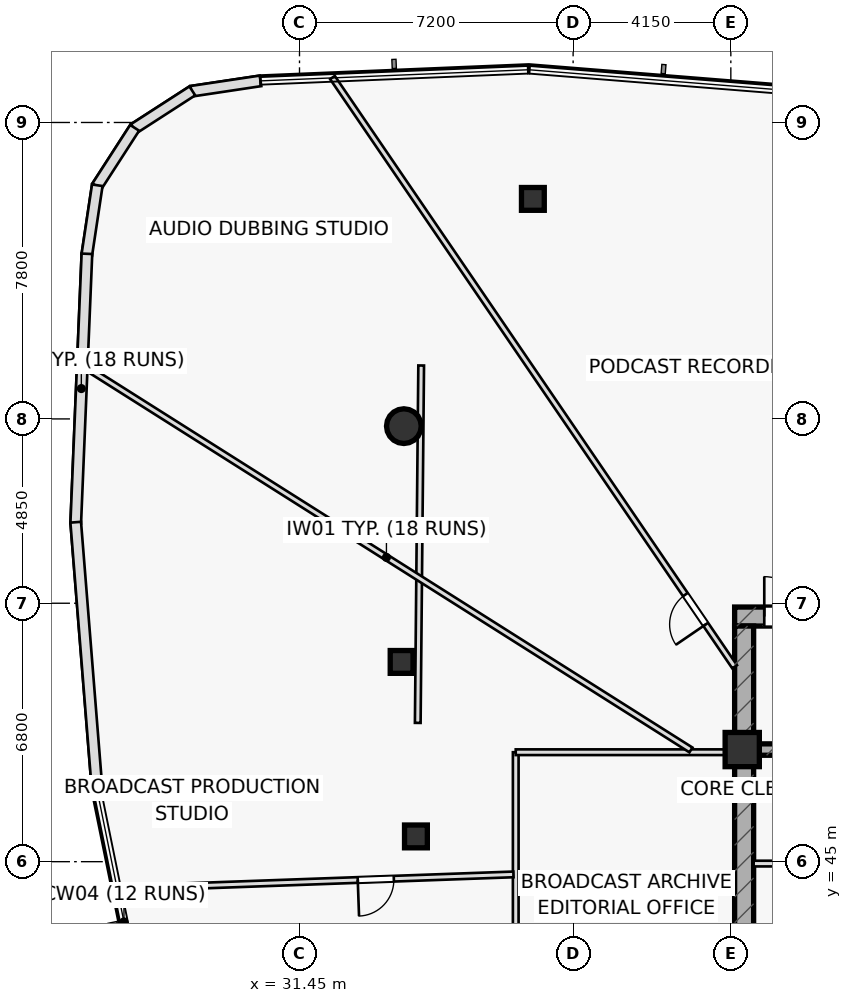
"""IFC4 building model, lengths in metres.
Left out: names, types, materials, properties, quantities, classifications, styles, units other than length and angle.
Written with IfcOpenShell. Run it as: python <this file> out.ifc"""

import sys

from ifc_helpers import new_model, si_unit, direction, frame, frame_2d, origin, origin_2d, place, context, subcontext, project, spatial, rectangle, hollow_rectangle, hollow_circle, extrude, element, fill, save


model = new_model("IFC4")
c1 = context("Model", 3, precision=1e-05, world=origin(), true_north=direction((0.0, 1.0)))
c2 = subcontext(c1, "Body", "Model", "MODEL_VIEW")
j1 = project(units=[si_unit("LENGTHUNIT", "METRE"), si_unit("PLANEANGLEUNIT", "RADIAN")], contexts=[c1])
p1 = place(None, origin())
s1 = spatial("IfcSite", under=j1, at=p1, CompositionType="ELEMENT")
p2 = place(p1, origin())
s2 = spatial("IfcBuilding", under=s1, at=p2, CompositionType="ELEMENT")
p3 = place(p2, frame((0.0, 0.0, 230.05)))
s3 = spatial("IfcBuildingStorey", under=s2, at=p3, CompositionType="ELEMENT", Elevation=230.05)
p4 = place(p3, frame((42.9, 51.45, 0.0), z_axis=(0.0, 0.0, 1.0), x_axis=(1.0, 0.0, 0.0)))
e1 = element("IfcWall", 1, at=p4, inside=s3, PredefinedType="SHEAR", context=c2, shape_type="SweptSolid", body=[
    extrude(rectangle(XDim=14.2, YDim=0.5, at=frame_2d((7.1, 0.0))), origin(), (0.0, 0.0, 1.0), 3.65),
])
p5 = place(p4, frame((0.78, 0.0, 0.0)))
e2 = element("IfcOpeningElement", 2, at=p5, cuts=e1, PredefinedType="OPENING", context=c2, shape_type="SweptSolid", body=[
    extrude(rectangle(XDim=1.05, YDim=2.2, at=frame_2d((0.525, 1.1))), frame((0.0, 0.26, 0.0), z_axis=(0.0, -1.0, 0.0), x_axis=(1.0, 0.0, 0.0)), (0.0, 0.0, 1.0), 0.52),
])
p6 = place(p3, frame((43.15, 38.8, 0.0), z_axis=(0.0, 0.0, 1.0), x_axis=(0.0, 1.0, 0.0)))
e3 = element("IfcWall", 3, at=p6, inside=s3, PredefinedType="SHEAR", context=c2, shape_type="SweptSolid", body=[
    extrude(rectangle(XDim=12.4, YDim=0.5, at=frame_2d((6.2, 0.0))), origin(), (0.0, 0.0, 1.0), 3.65),
])
p7 = place(p3, frame((43.4, 47.95, 0.0), z_axis=(0.0, 0.0, 1.0), x_axis=(1.0, 0.0, 0.0)))
e4 = element("IfcWall", 4, at=p7, inside=s3, PredefinedType="SHEAR", context=c2, shape_type="SweptSolid", body=[
    extrude(rectangle(XDim=13.2, YDim=0.3, at=frame_2d((6.6, 0.0))), origin(), (0.0, 0.0, 1.0), 3.65),
])
p8 = place(p7, frame((8.345, 0.0, 0.0)))
e5 = element("IfcOpeningElement", 5, at=p8, cuts=e4, PredefinedType="OPENING", context=c2, shape_type="SweptSolid", body=[
    extrude(rectangle(XDim=1.15, YDim=2.2, at=frame_2d((0.575, 1.1))), frame((0.0, 0.16, 0.0), z_axis=(0.0, -1.0, 0.0), x_axis=(1.0, 0.0, 0.0)), (0.0, 0.0, 1.0), 0.32),
])
p9 = place(p7, frame((10.065, 0.0, 0.0)))
e6 = element("IfcOpeningElement", 6, at=p9, cuts=e4, PredefinedType="OPENING", context=c2, shape_type="SweptSolid", body=[
    extrude(rectangle(XDim=1.15, YDim=2.2, at=frame_2d((0.575, 1.1))), frame((0.0, 0.16, 0.0), z_axis=(0.0, -1.0, 0.0), x_axis=(1.0, 0.0, 0.0)), (0.0, 0.0, 1.0), 0.32),
])
p10 = place(p7, frame((11.645, 0.0, 0.0)))
e7 = element("IfcOpeningElement", 7, at=p10, cuts=e4, PredefinedType="OPENING", context=c2, shape_type="SweptSolid", body=[
    extrude(rectangle(XDim=1.15, YDim=2.2, at=frame_2d((0.575, 1.1))), frame((0.0, 0.16, 0.0), z_axis=(0.0, -1.0, 0.0), x_axis=(1.0, 0.0, 0.0)), (0.0, 0.0, 1.0), 0.32),
])
p11 = place(p3, frame((43.1, 47.95, 0.0), z_axis=(0.0, 0.0, 1.0), x_axis=(1.0, 0.0, 0.0)))
e8 = element("IfcColumn", 8, at=p11, inside=s3, PredefinedType="COLUMN", context=c2, shape_type="SweptSolid", body=[
    extrude(rectangle(XDim=0.9, YDim=0.9, at=origin_2d()), origin(), (0.0, 0.0, 1.0), 3.65),
])
p12 = place(p3, frame((34.196, 56.46, 0.0), z_axis=(0.0, 0.0, 1.0), x_axis=(1.0, 0.0, 0.0)))
e9 = element("IfcColumn", 9, at=p12, inside=s3, PredefinedType="COLUMN", context=c2, shape_type="SweptSolid", body=[
    extrude(hollow_circle(Radius=0.457, WallThickness=0.04, at=origin_2d()), origin(), (0.0, 0.0, 1.0), 3.65),
])
for number, where, z_axis, x_axis in (
    (10, (34.137, 50.256, 0.0), (0.0, 0.0, 1.0), (1.0, 0.0, 0.0)),
    (11, (34.514, 45.665, 0.0), (0.0, 0.0, 1.0), (1.0, 0.0, 0.0)),
    (12, (37.591, 62.439, 0.0), (0.0, 0.0, 1.0), (1.0, 0.0, 0.0)),
):
    element("IfcColumn", number, at=place(p3, frame(where, z_axis=z_axis, x_axis=x_axis)), inside=s3, PredefinedType="COLUMN", context=c2, shape_type="SweptSolid", body=[
        extrude(hollow_rectangle(XDim=0.6, YDim=0.6, WallThickness=0.036, at=origin_2d()), origin(), (0.0, 0.0, 1.0), 3.65),
    ])
p13 = place(p3, frame((43.4, 44.95, 0.0), z_axis=(0.0, 0.0, 1.0), x_axis=(1.0, 0.0, 0.0)))
e13 = element("IfcWall", 13, at=p13, inside=s3, PredefinedType="PARTITIONING", context=c2, shape_type="SweptSolid", body=[
    extrude(rectangle(XDim=2.35, YDim=0.15, at=frame_2d((1.175, 0.0))), origin(), (0.0, 0.0, 1.0), 3.65),
])
p14 = place(p3, frame((34.652, 58.056, 0.0), z_axis=(0.0, 0.0, 1.0), x_axis=(-0.009553538759, -0.999954363907, 0.0)))
e14 = element("IfcWall", 14, at=p14, inside=s3, PredefinedType="PARTITIONING", context=c2, shape_type="SweptSolid", body=[
    extrude(rectangle(XDim=9.404, YDim=0.15, at=frame_2d((4.702, 0.0))), origin(), (0.0, 0.0, 1.0), 3.135),
])
p15 = place(p3, frame((37.14, 40.3, 0.0), z_axis=(0.0, 0.0, 1.0), x_axis=(0.0, 1.0, 0.0)))
e15 = element("IfcWall", 15, at=p15, inside=s3, PredefinedType="PARTITIONING", context=c2, shape_type="SweptSolid", body=[
    extrude(rectangle(XDim=7.58, YDim=0.15, at=frame_2d((3.79, 0.0))), origin(), (0.0, 0.0, 1.0), 3.65),
])
p16 = place(p3, frame((37.14, 47.88, 0.0), z_axis=(0.0, 0.0, 1.0), x_axis=(1.0, 0.0, 0.0)))
e16 = element("IfcWall", 16, at=p16, inside=s3, PredefinedType="PARTITIONING", context=c2, shape_type="SweptSolid", body=[
    extrude(rectangle(XDim=5.76, YDim=0.15, at=frame_2d((2.88, 0.0))), origin(), (0.0, 0.0, 1.0), 3.025),
])
p17 = place(p3, frame((42.9, 50.128, 0.0), z_axis=(0.0, 0.0, 1.0), x_axis=(-0.563742719505, 0.825950450212, 0.0)))
e17 = element("IfcWall", 17, at=p17, inside=s3, PredefinedType="PARTITIONING", context=c2, shape_type="SweptSolid", body=[
    extrude(rectangle(XDim=18.773, YDim=0.15, at=frame_2d((9.386, 0.0))), origin(), (0.0, 0.0, 1.0), 3.025),
])
p18 = place(p17, frame((1.35, 0.0, 0.0)))
e18 = element("IfcOpeningElement", 18, at=p18, cuts=e17, PredefinedType="OPENING", context=c2, shape_type="SweptSolid", body=[
    extrude(rectangle(XDim=0.95, YDim=2.05, at=frame_2d((0.475, 1.025))), frame((0.0, 0.085, 0.0), z_axis=(0.0, -1.0, 0.0), x_axis=(1.0, 0.0, 0.0)), (0.0, 0.0, 1.0), 0.17),
])
p19 = place(p3, frame((41.75, 47.94, 0.0), z_axis=(0.0, 0.0, 1.0), x_axis=(-0.845214636511, 0.534426999905, 0.0)))
e19 = element("IfcWall", 19, at=p19, inside=s3, PredefinedType="PARTITIONING", context=c2, shape_type="SweptSolid", body=[
    extrude(rectangle(XDim=18.96, YDim=0.15, at=frame_2d((9.48, 0.0))), origin(), (0.0, 0.0, 1.0), 3.025),
])
p20 = place(p3, frame((37.08, 44.665, 0.0), z_axis=(0.0, 0.0, 1.0), x_axis=(-0.99935523855, -0.035904138807, 0.0)))
e20 = element("IfcWall", 20, at=p20, inside=s3, PredefinedType="PARTITIONING", context=c2, shape_type="SweptSolid", body=[
    extrude(rectangle(XDim=10.445, YDim=0.15, at=frame_2d((5.222, 0.0))), origin(), (0.0, 0.0, 1.0), 3.135),
])
p21 = place(p20, frame((3.15, 0.0, 0.0)))
e21 = element("IfcOpeningElement", 21, at=p21, cuts=e20, PredefinedType="OPENING", context=c2, shape_type="SweptSolid", body=[
    extrude(rectangle(XDim=0.95, YDim=2.05, at=frame_2d((0.475, 1.025))), frame((0.0, 0.085, 0.0), z_axis=(0.0, -1.0, 0.0), x_axis=(1.0, 0.0, 0.0)), (0.0, 0.0, 1.0), 0.17),
])
p22 = place(p3, frame((30.424, 65.545, 0.0), z_axis=(0.0, 0.0, 1.0), x_axis=(-0.988886729677, -0.148670897856, 0.0)))
e22 = element("IfcWall", 22, at=p22, inside=s3, PredefinedType="STANDARD", context=c2, shape_type="SweptSolid", body=[
    extrude(rectangle(XDim=1.843, YDim=0.28, at=frame_2d((0.921, 0.0))), origin(), (0.0, 0.0, 1.0), 3.65),
])
p23 = place(p3, frame((28.629, 65.281, 0.0), z_axis=(0.0, 0.0, 1.0), x_axis=(-0.84006342803, -0.54248819055, 0.0)))
e23 = element("IfcWall", 23, at=p23, inside=s3, PredefinedType="STANDARD", context=c2, shape_type="SweptSolid", body=[
    extrude(rectangle(XDim=1.831, YDim=0.28, at=frame_2d((0.916, 0.0))), origin(), (0.0, 0.0, 1.0), 3.65),
])
p24 = place(p3, frame((27.112, 64.309, 0.0), z_axis=(0.0, 0.0, 1.0), x_axis=(-0.542394093963, -0.840124185364, 0.0)))
e24 = element("IfcWall", 24, at=p24, inside=s3, PredefinedType="STANDARD", context=c2, shape_type="SweptSolid", body=[
    extrude(rectangle(XDim=1.831, YDim=0.28, at=frame_2d((0.916, 0.0))), origin(), (0.0, 0.0, 1.0), 3.65),
])
p25 = place(p3, frame((26.129, 62.798, 0.0), z_axis=(0.0, 0.0, 1.0), x_axis=(-0.148701117204, -0.988882185977, 0.0)))
e25 = element("IfcWall", 25, at=p25, inside=s3, PredefinedType="STANDARD", context=c2, shape_type="SweptSolid", body=[
    extrude(rectangle(XDim=1.854, YDim=0.28, at=frame_2d((0.927, 0.0))), origin(), (0.0, 0.0, 1.0), 3.65),
])
p26 = place(p3, frame((25.856, 60.995, 0.0), z_axis=(0.0, 0.0, 1.0), x_axis=(-0.041476051047, -0.999139498363, 0.0)))
e26 = element("IfcWall", 26, at=p26, inside=s3, PredefinedType="STANDARD", context=c2, shape_type="SweptSolid", body=[
    extrude(rectangle(XDim=7.099, YDim=0.28, at=frame_2d((3.549, 0.0))), origin(), (0.0, 0.0, 1.0), 3.65),
])
p27 = place(p3, frame((25.561, 53.932, 0.0), z_axis=(0.0, 0.0, 1.0), x_axis=(0.079752068493, -0.996814730816, 0.0)))
e27 = element("IfcWall", 27, at=p27, inside=s3, PredefinedType="STANDARD", context=c2, shape_type="SweptSolid", body=[
    extrude(rectangle(XDim=7.087, YDim=0.28, at=frame_2d((3.543, 0.0))), origin(), (0.0, 0.0, 1.0), 3.65),
])
p28 = place(p5, origin())
e28 = element("IfcDoor", 28, at=p28, inside=s3, OperationType="SINGLE_SWING_LEFT", PredefinedType="DOOR", context=c2, shape_type="SweptSolid", body=[
    extrude(rectangle(XDim=1.05, YDim=2.2, at=frame_2d((0.525, 1.1))), frame((0.0, 0.025, 0.0), z_axis=(0.0, -1.0, 0.0), x_axis=(1.0, 0.0, 0.0)), (0.0, 0.0, 1.0), 0.05),
])
fill(e2, e28)
p29 = place(p18, origin())
e29 = element("IfcDoor", 29, at=p29, inside=s3, OperationType="SINGLE_SWING_LEFT", PredefinedType="DOOR", context=c2, shape_type="SweptSolid", body=[
    extrude(rectangle(XDim=0.95, YDim=2.05, at=frame_2d((0.475, 1.025))), frame((0.0, 0.025, 0.0), z_axis=(0.0, -1.0, 0.0), x_axis=(1.0, 0.0, 0.0)), (0.0, 0.0, 1.0), 0.05),
])
fill(e18, e29)
p30 = place(p21, origin())
e30 = element("IfcDoor", 30, at=p30, inside=s3, OperationType="SINGLE_SWING_RIGHT", PredefinedType="DOOR", context=c2, shape_type="SweptSolid", body=[
    extrude(rectangle(XDim=0.95, YDim=2.05, at=frame_2d((0.475, 1.025))), frame((0.0, 0.025, 0.0), z_axis=(0.0, -1.0, 0.0), x_axis=(1.0, 0.0, 0.0)), (0.0, 0.0, 1.0), 0.05),
])
fill(e21, e30)
save(model, sys.argv[1])
